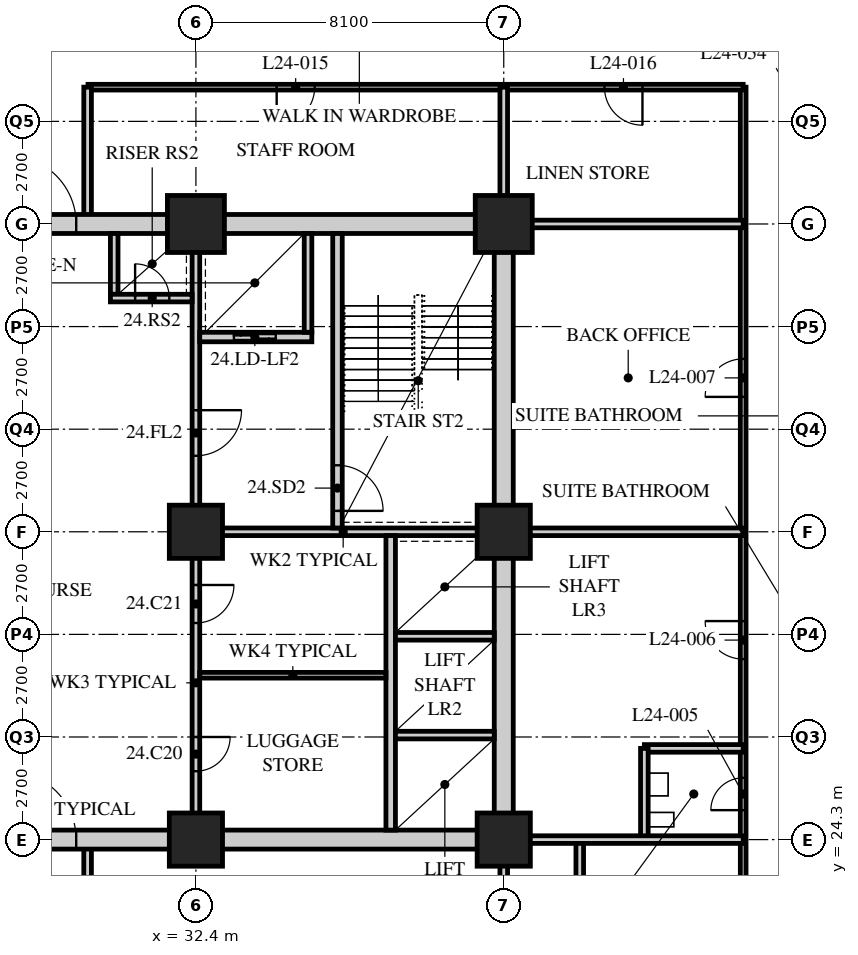
"""IFC4 building model, lengths in metres.
Left out: names, types, materials, properties, quantities, classifications, styles, units other than length and angle.
Written with IfcOpenShell. Run it as: python <this file> out.ifc"""

import sys

from ifc_helpers import new_model, si_unit, direction, frame, frame_2d, origin, origin_2d, place, context, subcontext, project, spatial, rectangle, hollow_rectangle, extrude, element, fill, save


model = new_model("IFC4")
c1 = context("Model", 3, precision=1e-05, world=origin(), true_north=direction((0.0, 1.0)))
c2 = subcontext(c1, "Body", "Model", "MODEL_VIEW")
j1 = project(units=[si_unit("LENGTHUNIT", "METRE"), si_unit("PLANEANGLEUNIT", "RADIAN")], contexts=[c1])
p1 = place(None, origin())
s1 = spatial("IfcSite", under=j1, at=p1, CompositionType="ELEMENT")
p2 = place(p1, origin())
s2 = spatial("IfcBuilding", under=s1, at=p2, CompositionType="ELEMENT")
p3 = place(p2, frame((0.0, 0.0, 98.0)))
s3 = spatial("IfcBuildingStorey", under=s2, at=p3, CompositionType="ELEMENT", Elevation=98.0)
for number, where, z_axis, x_axis in (
    (1, (32.4, 24.3, 0.0), (0.0, 0.0, 1.0), (1.0, 0.0, 0.0)),
    (2, (32.4, 32.4, 0.0), (0.0, 0.0, 1.0), (1.0, 0.0, 0.0)),
):
    element("IfcColumn", number, at=place(p3, frame(where, z_axis=z_axis, x_axis=x_axis)), inside=s3, PredefinedType="COLUMN", context=c2, shape_type="SweptSolid", body=[
        extrude(hollow_rectangle(XDim=1.4, YDim=1.4, WallThickness=0.12, at=origin_2d()), origin(), (0.0, 0.0, 1.0), 5.4),
    ])
p4 = place(p3, frame((32.4, 40.5, 0.0), z_axis=(0.0, 0.0, 1.0), x_axis=(1.0, 0.0, 0.0)))
e3 = element("IfcColumn", 3, at=p4, inside=s3, PredefinedType="COLUMN", context=c2, shape_type="SweptSolid", body=[
    extrude(hollow_rectangle(XDim=1.5, YDim=1.5, WallThickness=0.13, at=origin_2d()), origin(), (0.0, 0.0, 1.0), 5.4),
])
for number, where, z_axis, x_axis in (
    (4, (40.5, 24.3, 0.0), (0.0, 0.0, 1.0), (1.0, 0.0, 0.0)),
    (5, (40.5, 32.4, 0.0), (0.0, 0.0, 1.0), (1.0, 0.0, 0.0)),
):
    element("IfcColumn", number, at=place(p3, frame(where, z_axis=z_axis, x_axis=x_axis)), inside=s3, PredefinedType="COLUMN", context=c2, shape_type="SweptSolid", body=[
        extrude(hollow_rectangle(XDim=1.4, YDim=1.4, WallThickness=0.12, at=origin_2d()), origin(), (0.0, 0.0, 1.0), 5.4),
    ])
p5 = place(p3, frame((40.5, 40.5, 0.0), z_axis=(0.0, 0.0, 1.0), x_axis=(1.0, 0.0, 0.0)))
e6 = element("IfcColumn", 6, at=p5, inside=s3, PredefinedType="COLUMN", context=c2, shape_type="SweptSolid", body=[
    extrude(hollow_rectangle(XDim=1.5, YDim=1.5, WallThickness=0.13, at=origin_2d()), origin(), (0.0, 0.0, 1.0), 5.4),
])
p6 = place(p3, frame((46.8, 15.3, 0.0), z_axis=(0.0, 0.0, 1.0), x_axis=(0.0, 1.0, 0.0)))
e7 = element("IfcWall", 7, at=p6, inside=s3, PredefinedType="PARTITIONING", context=c2, shape_type="SweptSolid", body=[
    extrude(rectangle(XDim=28.8, YDim=0.15, at=frame_2d((14.4, 0.0))), origin(), (0.0, 0.0, 1.0), 5.19),
])
p7 = place(p6, frame((9.775, 0.0, 0.0)))
e8 = element("IfcOpeningElement", 8, at=p7, cuts=e7, PredefinedType="OPENING", context=c2, shape_type="SweptSolid", body=[
    extrude(rectangle(XDim=0.85, YDim=2.1, at=frame_2d((0.425, 1.05))), frame((0.0, 0.085, 0.0), z_axis=(0.0, -1.0, 0.0), x_axis=(1.0, 0.0, 0.0)), (0.0, 0.0, 1.0), 0.17),
])
p8 = place(p6, frame((13.75, 0.0, 0.0)))
e9 = element("IfcOpeningElement", 9, at=p8, cuts=e7, PredefinedType="OPENING", context=c2, shape_type="SweptSolid", body=[
    extrude(rectangle(XDim=1.0, YDim=2.1, at=frame_2d((0.5, 1.05))), frame((0.0, 0.085, 0.0), z_axis=(0.0, -1.0, 0.0), x_axis=(1.0, 0.0, 0.0)), (0.0, 0.0, 1.0), 0.17),
])
p9 = place(p6, frame((20.65, 0.0, 0.0)))
e10 = element("IfcOpeningElement", 10, at=p9, cuts=e7, PredefinedType="OPENING", context=c2, shape_type="SweptSolid", body=[
    extrude(rectangle(XDim=1.0, YDim=2.1, at=frame_2d((0.5, 1.05))), frame((0.0, 0.085, 0.0), z_axis=(0.0, -1.0, 0.0), x_axis=(1.0, 0.0, 0.0)), (0.0, 0.0, 1.0), 0.17),
])
p10 = place(p3, frame((46.8, 44.1, 0.0), z_axis=(0.0, 0.0, 1.0), x_axis=(-1.0, 0.0, 0.0)))
e11 = element("IfcWall", 11, at=p10, inside=s3, PredefinedType="PARTITIONING", context=c2, shape_type="SweptSolid", body=[
    extrude(rectangle(XDim=17.24, YDim=0.15, at=frame_2d((8.62, 0.0))), origin(), (0.0, 0.0, 1.0), 5.19),
])
p11 = place(p10, frame((11.275, 0.0, 0.0)))
e12 = element("IfcOpeningElement", 12, at=p11, cuts=e11, PredefinedType="OPENING", context=c2, shape_type="SweptSolid", body=[
    extrude(rectangle(XDim=1.0, YDim=2.1, at=frame_2d((0.5, 1.05))), frame((0.0, 0.085, 0.0), z_axis=(0.0, -1.0, 0.0), x_axis=(1.0, 0.0, 0.0)), (0.0, 0.0, 1.0), 0.17),
])
p12 = place(p10, frame((2.65, 0.0, 0.0)))
e13 = element("IfcOpeningElement", 13, at=p12, cuts=e11, PredefinedType="OPENING", context=c2, shape_type="SweptSolid", body=[
    extrude(rectangle(XDim=1.0, YDim=2.1, at=frame_2d((0.5, 1.05))), frame((0.0, 0.085, 0.0), z_axis=(0.0, -1.0, 0.0), x_axis=(1.0, 0.0, 0.0)), (0.0, 0.0, 1.0), 0.17),
])
p13 = place(p3, frame((40.5, 32.4, 0.0), z_axis=(0.0, 0.0, 1.0), x_axis=(1.0, 0.0, 0.0)))
e14 = element("IfcWall", 14, at=p13, inside=s3, PredefinedType="SOLIDWALL", context=c2, shape_type="SweptSolid", body=[
    extrude(rectangle(XDim=6.3, YDim=0.2, at=frame_2d((3.15, 0.0))), origin(), (0.0, 0.0, 1.0), 5.19),
])
p14 = place(p3, frame((46.8, 26.7, 0.0), z_axis=(0.0, 0.0, 1.0), x_axis=(-1.0, 0.0, 0.0)))
e15 = element("IfcWall", 15, at=p14, inside=s3, PredefinedType="SOLIDWALL", context=c2, shape_type="SweptSolid", body=[
    extrude(rectangle(XDim=2.6, YDim=0.2, at=frame_2d((1.3, 0.0))), origin(), (0.0, 0.0, 1.0), 5.19),
])
p15 = place(p3, frame((44.2, 24.3, 0.0), z_axis=(0.0, 0.0, 1.0), x_axis=(0.0, 1.0, 0.0)))
e16 = element("IfcWall", 16, at=p15, inside=s3, PredefinedType="SOLIDWALL", context=c2, shape_type="SweptSolid", body=[
    extrude(rectangle(XDim=2.4, YDim=0.2, at=frame_2d((1.2, 0.0))), origin(), (0.0, 0.0, 1.0), 5.19),
])
p16 = place(p3, frame((40.5, 15.3, 0.0), z_axis=(0.0, 0.0, 1.0), x_axis=(0.0, 1.0, 0.0)))
e17 = element("IfcWall", 17, at=p16, inside=s3, PredefinedType="SOLIDWALL", context=c2, shape_type="SweptSolid", body=[
    extrude(rectangle(XDim=9.0, YDim=0.2, at=frame_2d((4.5, 0.0))), origin(), (0.0, 0.0, 1.0), 4.49),
])
for number, where, z_axis, x_axis in (
    (18, (42.5, 15.3, 0.0), (0.0, 0.0, 1.0), (0.0, 1.0, 0.0)),
    (19, (29.55, 15.3, 0.0), (0.0, 0.0, 1.0), (0.0, 1.0, 0.0)),
):
    element("IfcWall", number, at=place(p3, frame(where, z_axis=z_axis, x_axis=x_axis)), inside=s3, PredefinedType="SOLIDWALL", context=c2, shape_type="SweptSolid", body=[
        extrude(rectangle(XDim=9.0, YDim=0.2, at=frame_2d((4.5, 0.0))), origin(), (0.0, 0.0, 1.0), 5.19),
    ])
p17 = place(p3, frame((40.5, 40.5, 0.0), z_axis=(0.0, 0.0, 1.0), x_axis=(0.0, 1.0, 0.0)))
e20 = element("IfcWall", 20, at=p17, inside=s3, PredefinedType="SOLIDWALL", context=c2, shape_type="SweptSolid", body=[
    extrude(rectangle(XDim=3.6, YDim=0.2, at=frame_2d((1.8, 0.0))), origin(), (0.0, 0.0, 1.0), 4.49),
])
p18 = place(p3, frame((29.55, 40.5, 0.0), z_axis=(0.0, 0.0, 1.0), x_axis=(0.0, 1.0, 0.0)))
e21 = element("IfcWall", 21, at=p18, inside=s3, PredefinedType="SOLIDWALL", context=c2, shape_type="SweptSolid", body=[
    extrude(rectangle(XDim=3.6, YDim=0.2, at=frame_2d((1.8, 0.0))), origin(), (0.0, 0.0, 1.0), 5.19),
])
for number, where, z_axis, x_axis in (
    (22, (40.5, 24.3, 0.0), (0.0, 0.0, 1.0), (1.0, 0.0, 0.0)),
    (23, (40.5, 40.5, 0.0), (0.0, 0.0, 1.0), (1.0, 0.0, 0.0)),
):
    element("IfcWall", number, at=place(p3, frame(where, z_axis=z_axis, x_axis=x_axis)), inside=s3, PredefinedType="SOLIDWALL", context=c2, shape_type="SweptSolid", body=[
        extrude(rectangle(XDim=6.3, YDim=0.2, at=frame_2d((3.15, 0.0))), origin(), (0.0, 0.0, 1.0), 5.19),
    ])
p19 = place(p3, frame((15.95, 24.3, 0.0), z_axis=(0.0, 0.0, 1.0), x_axis=(1.0, 0.0, 0.0)))
e24 = element("IfcWall", 24, at=p19, inside=s3, PredefinedType="SOLIDWALL", context=c2, shape_type="SweptSolid", body=[
    extrude(rectangle(XDim=24.8, YDim=0.5, at=frame_2d((12.4, 0.0))), origin(), (0.0, 0.0, 1.0), 4.49),
])
p20 = place(p19, frame((11.5, 0.0, 0.0)))
e25 = element("IfcOpeningElement", 25, at=p20, cuts=e24, PredefinedType="OPENING", context=c2, shape_type="SweptSolid", body=[
    extrude(rectangle(XDim=1.8, YDim=2.4, at=frame_2d((0.9, 1.2))), frame((0.0, 0.26, 0.0), z_axis=(0.0, -1.0, 0.0), x_axis=(1.0, 0.0, 0.0)), (0.0, 0.0, 1.0), 0.52),
])
p21 = place(p3, frame((15.95, 40.5, 0.0), z_axis=(0.0, 0.0, 1.0), x_axis=(1.0, 0.0, 0.0)))
e26 = element("IfcWall", 26, at=p21, inside=s3, PredefinedType="SOLIDWALL", context=c2, shape_type="SweptSolid", body=[
    extrude(rectangle(XDim=24.8, YDim=0.5, at=frame_2d((12.4, 0.0))), origin(), (0.0, 0.0, 1.0), 4.49),
])
p22 = place(p21, frame((11.5, 0.0, 0.0)))
e27 = element("IfcOpeningElement", 27, at=p22, cuts=e26, PredefinedType="OPENING", context=c2, shape_type="SweptSolid", body=[
    extrude(rectangle(XDim=1.8, YDim=2.4, at=frame_2d((0.9, 1.2))), frame((0.0, 0.26, 0.0), z_axis=(0.0, -1.0, 0.0), x_axis=(1.0, 0.0, 0.0)), (0.0, 0.0, 1.0), 0.52),
])
p23 = place(p3, frame((40.5, 24.55, 0.0), z_axis=(0.0, 0.0, 1.0), x_axis=(0.0, 1.0, 0.0)))
e28 = element("IfcWall", 28, at=p23, inside=s3, PredefinedType="SOLIDWALL", context=c2, shape_type="SweptSolid", body=[
    extrude(rectangle(XDim=15.7, YDim=0.5, at=frame_2d((7.85, 0.0))), origin(), (0.0, 0.0, 1.0), 4.49),
])
p24 = place(p3, frame((32.3, 32.4, 0.0), z_axis=(0.0, 0.0, 1.0), x_axis=(1.0, 0.0, 0.0)))
e29 = element("IfcWall", 29, at=p24, inside=s3, PredefinedType="SOLIDWALL", context=c2, shape_type="SweptSolid", body=[
    extrude(rectangle(XDim=7.95, YDim=0.2, at=frame_2d((3.975, 0.0))), origin(), (0.0, 0.0, 1.0), 4.578),
])
p25 = place(p3, frame((32.4, 32.5, 0.0), z_axis=(0.0, 0.0, 1.0), x_axis=(0.0, 1.0, 0.0)))
e30 = element("IfcWall", 30, at=p25, inside=s3, PredefinedType="SOLIDWALL", context=c2, shape_type="SweptSolid", body=[
    extrude(rectangle(XDim=7.75, YDim=0.2, at=frame_2d((3.875, 0.0))), origin(), (0.0, 0.0, 1.0), 4.578),
])
p26 = place(p25, frame((1.9, 0.0, 0.0)))
e31 = element("IfcOpeningElement", 31, at=p26, cuts=e30, PredefinedType="OPENING", context=c2, shape_type="SweptSolid", body=[
    extrude(rectangle(XDim=1.2, YDim=2.1, at=frame_2d((0.6, 1.05))), frame((0.0, 0.11, 0.0), z_axis=(0.0, -1.0, 0.0), x_axis=(1.0, 0.0, 0.0)), (0.0, 0.0, 1.0), 0.22),
])
p27 = place(p3, frame((37.525, 24.55, 0.0), z_axis=(0.0, 0.0, 1.0), x_axis=(0.0, 1.0, 0.0)))
e32 = element("IfcWall", 32, at=p27, inside=s3, PredefinedType="SOLIDWALL", context=c2, shape_type="SweptSolid", body=[
    extrude(rectangle(XDim=7.75, YDim=0.25, at=frame_2d((3.875, 0.0))), origin(), (0.0, 0.0, 1.0), 5.19),
])
for number, where, z_axis, x_axis in (
    (33, (37.65, 27.05, 0.0), (0.0, 0.0, 1.0), (1.0, 0.0, 0.0)),
    (34, (37.65, 29.65, 0.0), (0.0, 0.0, 1.0), (1.0, 0.0, 0.0)),
):
    element("IfcWall", number, at=place(p3, frame(where, z_axis=z_axis, x_axis=x_axis)), inside=s3, PredefinedType="SOLIDWALL", context=c2, shape_type="SweptSolid", body=[
        extrude(rectangle(XDim=2.6, YDim=0.2, at=frame_2d((1.3, 0.0))), origin(), (0.0, 0.0, 1.0), 5.19),
    ])
p28 = place(p3, frame((36.125, 32.5, 0.0), z_axis=(0.0, 0.0, 1.0), x_axis=(0.0, 1.0, 0.0)))
e35 = element("IfcWall", 35, at=p28, inside=s3, PredefinedType="SOLIDWALL", context=c2, shape_type="SweptSolid", body=[
    extrude(rectangle(XDim=7.75, YDim=0.25, at=frame_2d((3.875, 0.0))), origin(), (0.0, 0.0, 1.0), 5.19),
])
p29 = place(p28, frame((0.45, 0.0, 0.0)))
e36 = element("IfcOpeningElement", 36, at=p29, cuts=e35, PredefinedType="OPENING", context=c2, shape_type="SweptSolid", body=[
    extrude(rectangle(XDim=1.2, YDim=2.1, at=frame_2d((0.6, 1.05))), frame((0.0, 0.135, 0.0), z_axis=(0.0, -1.0, 0.0), x_axis=(1.0, 0.0, 0.0)), (0.0, 0.0, 1.0), 0.27),
])
p30 = place(p3, frame((32.5, 37.525, 0.0), z_axis=(0.0, 0.0, 1.0), x_axis=(1.0, 0.0, 0.0)))
e37 = element("IfcWall", 37, at=p30, inside=s3, PredefinedType="SOLIDWALL", context=c2, shape_type="SweptSolid", body=[
    extrude(rectangle(XDim=2.95, YDim=0.25, at=frame_2d((1.475, 0.0))), origin(), (0.0, 0.0, 1.0), 5.19),
])
p31 = place(p30, frame((0.9, 0.0, 0.0)))
e38 = element("IfcOpeningElement", 38, at=p31, cuts=e37, PredefinedType="OPENING", context=c2, shape_type="SweptSolid", body=[
    extrude(rectangle(XDim=1.1, YDim=2.4, at=frame_2d((0.55, 1.2))), frame((0.0, 0.135, 0.0), z_axis=(0.0, -1.0, 0.0), x_axis=(1.0, 0.0, 0.0)), (0.0, 0.0, 1.0), 0.27),
])
p32 = place(p3, frame((35.35, 37.65, 0.0), z_axis=(0.0, 0.0, 1.0), x_axis=(0.0, 1.0, 0.0)))
e39 = element("IfcWall", 39, at=p32, inside=s3, PredefinedType="SOLIDWALL", context=c2, shape_type="SweptSolid", body=[
    extrude(rectangle(XDim=2.6, YDim=0.2, at=frame_2d((1.3, 0.0))), origin(), (0.0, 0.0, 1.0), 5.19),
])
p33 = place(p3, frame((30.25, 38.65, 0.0), z_axis=(0.0, 0.0, 1.0), x_axis=(0.0, 1.0, 0.0)))
e40 = element("IfcWall", 40, at=p33, inside=s3, PredefinedType="SOLIDWALL", context=c2, shape_type="SweptSolid", body=[
    extrude(rectangle(XDim=1.6, YDim=0.2, at=frame_2d((0.8, 0.0))), origin(), (0.0, 0.0, 1.0), 5.19),
])
p34 = place(p3, frame((30.15, 38.55, 0.0), z_axis=(0.0, 0.0, 1.0), x_axis=(1.0, 0.0, 0.0)))
e41 = element("IfcWall", 41, at=p34, inside=s3, PredefinedType="SOLIDWALL", context=c2, shape_type="SweptSolid", body=[
    extrude(rectangle(XDim=2.15, YDim=0.2, at=frame_2d((1.075, 0.0))), origin(), (0.0, 0.0, 1.0), 5.19),
])
p35 = place(p34, frame((0.65, 0.0, 0.0)))
e42 = element("IfcOpeningElement", 42, at=p35, cuts=e41, PredefinedType="OPENING", context=c2, shape_type="SweptSolid", body=[
    extrude(rectangle(XDim=0.9, YDim=2.1, at=frame_2d((0.45, 1.05))), frame((0.0, 0.11, 0.0), z_axis=(0.0, -1.0, 0.0), x_axis=(1.0, 0.0, 0.0)), (0.0, 0.0, 1.0), 0.22),
])
p36 = place(p3, frame((32.4, 24.55, 0.0), z_axis=(0.0, 0.0, 1.0), x_axis=(0.0, 1.0, 0.0)))
e43 = element("IfcWall", 43, at=p36, inside=s3, PredefinedType="PARTITIONING", context=c2, shape_type="SweptSolid", body=[
    extrude(rectangle(XDim=7.75, YDim=0.2, at=frame_2d((3.875, 0.0))), origin(), (0.0, 0.0, 1.0), 4.578),
])
p37 = place(p36, frame((1.55, 0.0, 0.0)))
e44 = element("IfcOpeningElement", 44, at=p37, cuts=e43, PredefinedType="OPENING", context=c2, shape_type="SweptSolid", body=[
    extrude(rectangle(XDim=0.9, YDim=2.1, at=frame_2d((0.45, 1.05))), frame((0.0, 0.11, 0.0), z_axis=(0.0, -1.0, 0.0), x_axis=(1.0, 0.0, 0.0)), (0.0, 0.0, 1.0), 0.22),
])
p38 = place(p36, frame((5.45, 0.0, 0.0)))
e45 = element("IfcOpeningElement", 45, at=p38, cuts=e43, PredefinedType="OPENING", context=c2, shape_type="SweptSolid", body=[
    extrude(rectangle(XDim=1.0, YDim=2.1, at=frame_2d((0.5, 1.05))), frame((0.0, 0.11, 0.0), z_axis=(0.0, -1.0, 0.0), x_axis=(1.0, 0.0, 0.0)), (0.0, 0.0, 1.0), 0.22),
])
p39 = place(p3, frame((32.5, 28.625, 0.0), z_axis=(0.0, 0.0, 1.0), x_axis=(1.0, 0.0, 0.0)))
e46 = element("IfcWall", 46, at=p39, inside=s3, PredefinedType="PARTITIONING", context=c2, shape_type="SweptSolid", body=[
    extrude(rectangle(XDim=4.9, YDim=0.15, at=frame_2d((2.45, 0.0))), origin(), (0.0, 0.0, 1.0), 5.19),
])
p40 = place(p7, origin())
e47 = element("IfcDoor", 47, at=p40, inside=s3, OperationType="SINGLE_SWING_LEFT", PredefinedType="DOOR", context=c2, shape_type="SweptSolid", body=[
    extrude(rectangle(XDim=0.85, YDim=2.1, at=frame_2d((0.425, 1.05))), frame((0.0, 0.025, 0.0), z_axis=(0.0, -1.0, 0.0), x_axis=(1.0, 0.0, 0.0)), (0.0, 0.0, 1.0), 0.05),
])
fill(e8, e47)
p41 = place(p8, origin())
e48 = element("IfcDoor", 48, at=p41, inside=s3, OperationType="SINGLE_SWING_RIGHT", PredefinedType="DOOR", context=c2, shape_type="SweptSolid", body=[
    extrude(rectangle(XDim=1.0, YDim=2.1, at=frame_2d((0.5, 1.05))), frame((0.0, 0.025, 0.0), z_axis=(0.0, -1.0, 0.0), x_axis=(1.0, 0.0, 0.0)), (0.0, 0.0, 1.0), 0.05),
])
fill(e9, e48)
p42 = place(p9, origin())
e49 = element("IfcDoor", 49, at=p42, inside=s3, OperationType="SINGLE_SWING_LEFT", PredefinedType="DOOR", context=c2, shape_type="SweptSolid", body=[
    extrude(rectangle(XDim=1.0, YDim=2.1, at=frame_2d((0.5, 1.05))), frame((0.0, 0.025, 0.0), z_axis=(0.0, -1.0, 0.0), x_axis=(1.0, 0.0, 0.0)), (0.0, 0.0, 1.0), 0.05),
])
fill(e10, e49)
p43 = place(p11, origin())
e50 = element("IfcDoor", 50, at=p43, inside=s3, OperationType="SINGLE_SWING_RIGHT", PredefinedType="DOOR", context=c2, shape_type="SweptSolid", body=[
    extrude(rectangle(XDim=1.0, YDim=2.1, at=frame_2d((0.5, 1.05))), frame((0.0, 0.025, 0.0), z_axis=(0.0, -1.0, 0.0), x_axis=(1.0, 0.0, 0.0)), (0.0, 0.0, 1.0), 0.05),
])
fill(e12, e50)
p44 = place(p12, origin())
e51 = element("IfcDoor", 51, at=p44, inside=s3, OperationType="SINGLE_SWING_LEFT", PredefinedType="DOOR", context=c2, shape_type="SweptSolid", body=[
    extrude(rectangle(XDim=1.0, YDim=2.1, at=frame_2d((0.5, 1.05))), frame((0.0, 0.025, 0.0), z_axis=(0.0, -1.0, 0.0), x_axis=(1.0, 0.0, 0.0)), (0.0, 0.0, 1.0), 0.05),
])
fill(e13, e51)
p45 = place(p37, origin())
e52 = element("IfcDoor", 52, at=p45, inside=s3, OperationType="SINGLE_SWING_LEFT", PredefinedType="DOOR", context=c2, shape_type="SweptSolid", body=[
    extrude(rectangle(XDim=0.9, YDim=2.1, at=frame_2d((0.45, 1.05))), frame((0.0, 0.025, 0.0), z_axis=(0.0, -1.0, 0.0), x_axis=(1.0, 0.0, 0.0)), (0.0, 0.0, 1.0), 0.05),
])
fill(e44, e52)
p46 = place(p38, origin())
e53 = element("IfcDoor", 53, at=p46, inside=s3, OperationType="SINGLE_SWING_LEFT", PredefinedType="DOOR", context=c2, shape_type="SweptSolid", body=[
    extrude(rectangle(XDim=1.0, YDim=2.1, at=frame_2d((0.5, 1.05))), frame((0.0, 0.025, 0.0), z_axis=(0.0, -1.0, 0.0), x_axis=(1.0, 0.0, 0.0)), (0.0, 0.0, 1.0), 0.05),
])
fill(e45, e53)
p47 = place(p29, origin())
e54 = element("IfcDoor", 54, at=p47, inside=s3, OperationType="SINGLE_SWING_RIGHT", PredefinedType="DOOR", context=c2, shape_type="SweptSolid", body=[
    extrude(rectangle(XDim=1.2, YDim=2.1, at=frame_2d((0.6, 1.05))), frame((0.0, 0.025, 0.0), z_axis=(0.0, -1.0, 0.0), x_axis=(1.0, 0.0, 0.0)), (0.0, 0.0, 1.0), 0.05),
])
fill(e36, e54)
p48 = place(p26, origin())
e55 = element("IfcDoor", 55, at=p48, inside=s3, OperationType="SINGLE_SWING_LEFT", PredefinedType="DOOR", context=c2, shape_type="SweptSolid", body=[
    extrude(rectangle(XDim=1.2, YDim=2.1, at=frame_2d((0.6, 1.05))), frame((0.0, 0.025, 0.0), z_axis=(0.0, -1.0, 0.0), x_axis=(1.0, 0.0, 0.0)), (0.0, 0.0, 1.0), 0.05),
])
fill(e31, e55)
p49 = place(p35, origin())
e56 = element("IfcDoor", 56, at=p49, inside=s3, OperationType="SINGLE_SWING_LEFT", PredefinedType="DOOR", context=c2, shape_type="SweptSolid", body=[
    extrude(rectangle(XDim=0.9, YDim=2.1, at=frame_2d((0.45, 1.05))), frame((0.0, 0.025, 0.0), z_axis=(0.0, -1.0, 0.0), x_axis=(1.0, 0.0, 0.0)), (0.0, 0.0, 1.0), 0.05),
])
fill(e42, e56)
p50 = place(p31, origin())
e57 = element("IfcDoor", 57, at=p50, inside=s3, OperationType="DOUBLE_DOOR_SLIDING", PredefinedType="DOOR", context=c2, shape_type="SweptSolid", body=[
    extrude(rectangle(XDim=1.1, YDim=2.4, at=frame_2d((0.55, 1.2))), frame((0.0, 0.025, 0.0), z_axis=(0.0, -1.0, 0.0), x_axis=(1.0, 0.0, 0.0)), (0.0, 0.0, 1.0), 0.05),
])
fill(e38, e57)
p51 = place(p20, origin())
e58 = element("IfcDoor", 58, at=p51, inside=s3, OperationType="DOUBLE_DOOR_SINGLE_SWING", PredefinedType="DOOR", context=c2, shape_type="SweptSolid", body=[
    extrude(rectangle(XDim=1.8, YDim=2.4, at=frame_2d((0.9, 1.2))), frame((0.0, 0.025, 0.0), z_axis=(0.0, -1.0, 0.0), x_axis=(1.0, 0.0, 0.0)), (0.0, 0.0, 1.0), 0.05),
])
fill(e25, e58)
p52 = place(p22, origin())
e59 = element("IfcDoor", 59, at=p52, inside=s3, OperationType="DOUBLE_DOOR_SINGLE_SWING", PredefinedType="DOOR", context=c2, shape_type="SweptSolid", body=[
    extrude(rectangle(XDim=1.8, YDim=2.4, at=frame_2d((0.9, 1.2))), frame((0.0, 0.025, 0.0), z_axis=(0.0, -1.0, 0.0), x_axis=(1.0, 0.0, 0.0)), (0.0, 0.0, 1.0), 0.05),
])
fill(e27, e59)
save(model, sys.argv[1])
